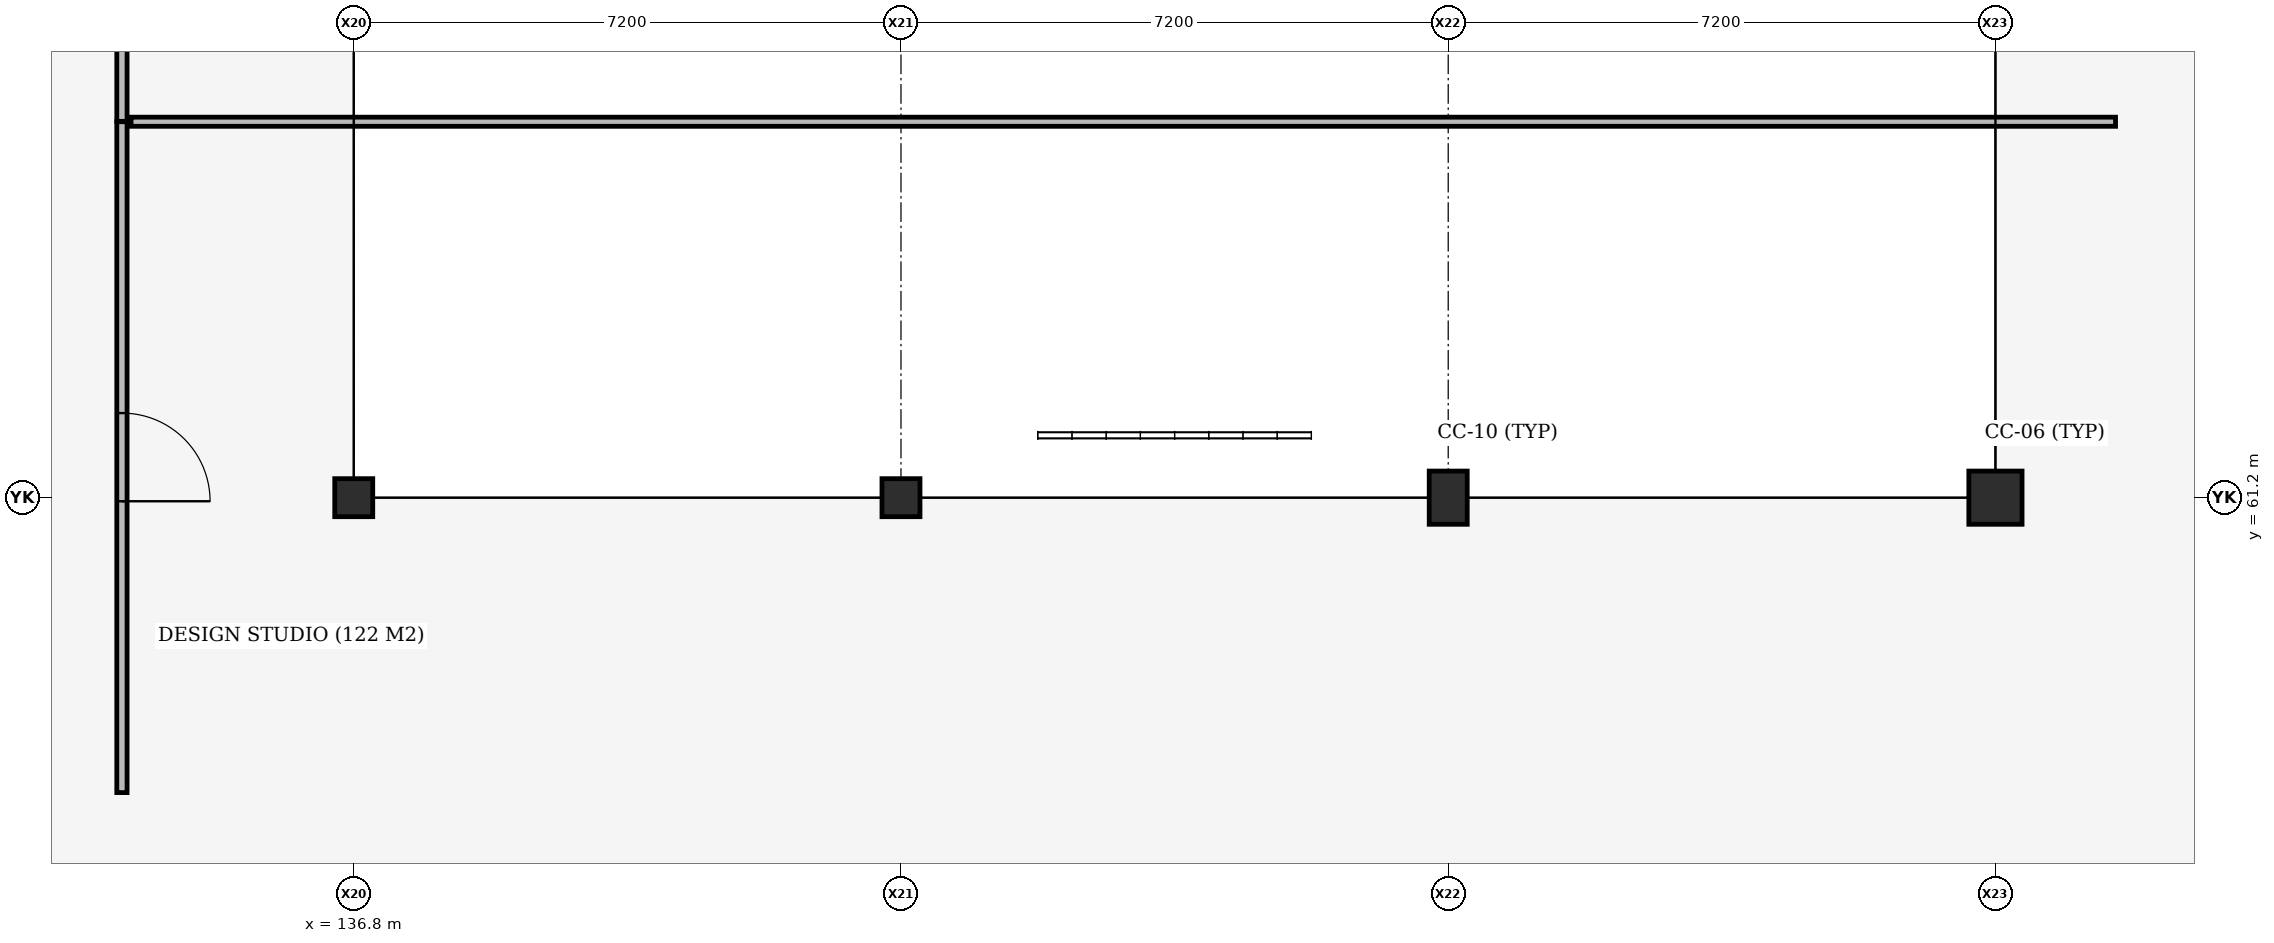
"""IFC4 building model, lengths in metres.
Left out: names, types, materials, properties, quantities, classifications, styles, units other than length and angle.
Written with IfcOpenShell. Run it as: python <this file> out.ifc"""

import sys

from ifc_helpers import new_model, si_unit, direction, frame, frame_2d, origin, origin_2d, place, context, subcontext, project, spatial, rectangle, extrude, element, fill, save


model = new_model("IFC4")
c1 = context("Model", 3, precision=1e-05, world=origin(), true_north=direction((0.0, 1.0)))
c2 = subcontext(c1, "Body", "Model", "MODEL_VIEW")
j1 = project(units=[si_unit("LENGTHUNIT", "METRE"), si_unit("PLANEANGLEUNIT", "RADIAN")], contexts=[c1])
p1 = place(None, origin())
s1 = spatial("IfcSite", under=j1, at=p1, CompositionType="ELEMENT")
p2 = place(p1, origin())
s2 = spatial("IfcBuilding", under=s1, at=p2, CompositionType="ELEMENT")
p3 = place(p2, origin())
s3 = spatial("IfcBuildingStorey", under=s2, at=p3, CompositionType="ELEMENT", Elevation=0.0)
for number, where, z_axis, x_axis in (
    (1, (136.8, 61.2, 0.0), (0.0, 0.0, 1.0), (1.0, 0.0, 0.0)),
    (2, (144.0, 61.2, 0.0), (0.0, 0.0, 1.0), (1.0, 0.0, 0.0)),
):
    element("IfcColumn", number, at=place(p3, frame(where, z_axis=z_axis, x_axis=x_axis)), inside=s3, PredefinedType="COLUMN", context=c2, shape_type="SweptSolid", body=[
        extrude(rectangle(XDim=0.5, YDim=0.5, at=origin_2d()), origin(), (0.0, 0.0, 1.0), 5.1),
    ])
p4 = place(p3, frame((151.2, 61.2, 0.0), z_axis=(0.0, 0.0, 1.0), x_axis=(1.0, 0.0, 0.0)))
e3 = element("IfcColumn", 3, at=p4, inside=s3, PredefinedType="COLUMN", context=c2, shape_type="SweptSolid", body=[
    extrude(rectangle(XDim=0.5, YDim=0.7, at=origin_2d()), origin(), (0.0, 0.0, 1.0), 5.1),
])
p5 = place(p3, frame((158.4, 61.2, 0.0), z_axis=(0.0, 0.0, 1.0), x_axis=(1.0, 0.0, 0.0)))
e4 = element("IfcColumn", 4, at=p5, inside=s3, PredefinedType="COLUMN", context=c2, shape_type="SweptSolid", body=[
    extrude(rectangle(XDim=0.7, YDim=0.7, at=origin_2d()), origin(), (0.0, 0.0, 1.0), 5.1),
])
p6 = place(p3, frame((133.75, 57.32, 0.0), z_axis=(0.0, 0.0, 1.0), x_axis=(0.0, 1.0, 0.0)))
e5 = element("IfcWall", 5, at=p6, inside=s3, PredefinedType="PARTITIONING", context=c2, shape_type="SweptSolid", body=[
    extrude(rectangle(XDim=8.826, YDim=0.135, at=frame_2d((4.413, 0.0))), origin(), (0.0, 0.0, 1.0), 4.45),
])
p7 = place(p6, frame((3.833, 0.0, 0.0)))
e6 = element("IfcOpeningElement", 6, at=p7, cuts=e5, PredefinedType="OPENING", context=c2, shape_type="SweptSolid", body=[
    extrude(rectangle(XDim=1.16, YDim=2.2, at=frame_2d((0.58, 1.1))), frame((0.0, 0.077, 0.0), z_axis=(0.0, -1.0, 0.0), x_axis=(1.0, 0.0, 0.0)), (0.0, 0.0, 1.0), 0.155),
])
p8 = place(p3, frame((133.87, 66.146, 0.0), z_axis=(0.0, 0.0, 1.0), x_axis=(1.0, 0.0, 0.0)))
e7 = element("IfcWall", 7, at=p8, inside=s3, PredefinedType="PARTITIONING", context=c2, shape_type="SweptSolid", body=[
    extrude(rectangle(XDim=26.11, YDim=0.12, at=frame_2d((13.055, 0.0))), origin(), (0.0, 0.0, 1.0), 4.45),
])
p9 = place(p3, frame((133.75, 66.151, 0.0), z_axis=(0.0, 0.0, 1.0), x_axis=(0.0, 1.0, 0.0)))
e8 = element("IfcWall", 8, at=p9, inside=s3, PredefinedType="PARTITIONING", context=c2, shape_type="SweptSolid", body=[
    extrude(rectangle(XDim=3.244, YDim=0.135, at=frame_2d((1.622, 0.0))), origin(), (0.0, 0.0, 1.0), 4.35),
])
p10 = place(p9, frame((1.047, 0.0, 0.0)))
e9 = element("IfcOpeningElement", 9, at=p10, cuts=e8, PredefinedType="OPENING", context=c2, shape_type="SweptSolid", body=[
    extrude(rectangle(XDim=1.15, YDim=2.2, at=frame_2d((0.575, 1.1))), frame((0.0, 0.077, 0.0), z_axis=(0.0, -1.0, 0.0), x_axis=(1.0, 0.0, 0.0)), (0.0, 0.0, 1.0), 0.155),
])
p11 = place(p7, origin())
e10 = element("IfcDoor", 10, at=p11, inside=s3, OperationType="SINGLE_SWING_RIGHT", PredefinedType="DOOR", context=c2, shape_type="SweptSolid", body=[
    extrude(rectangle(XDim=1.16, YDim=2.2, at=frame_2d((0.58, 1.1))), frame((0.0, 0.025, 0.0), z_axis=(0.0, -1.0, 0.0), x_axis=(1.0, 0.0, 0.0)), (0.0, 0.0, 1.0), 0.05),
])
fill(e6, e10)
save(model, sys.argv[1])
